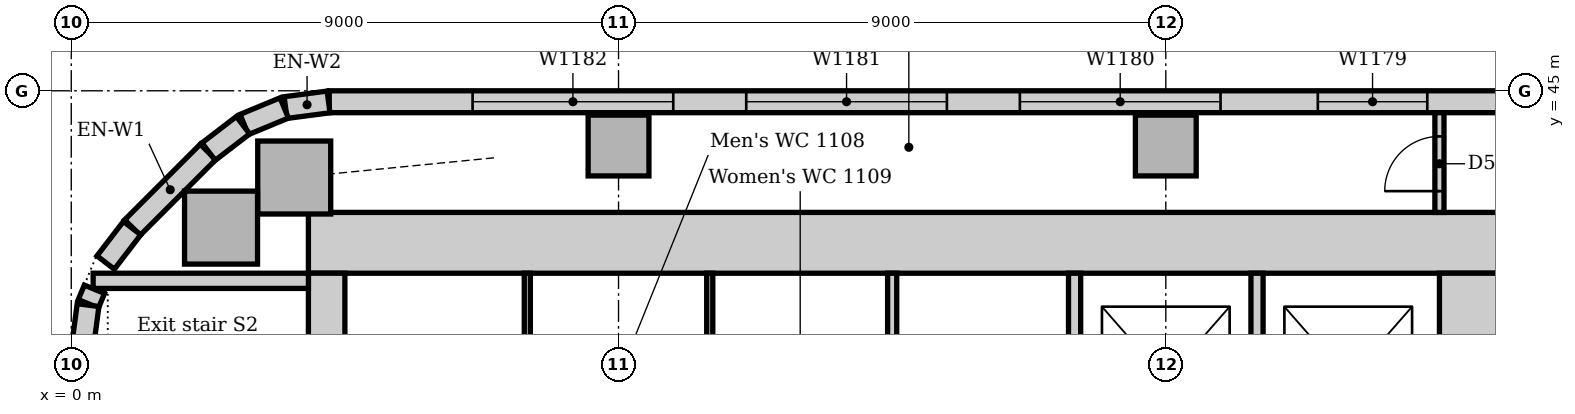
"""IFC4 building model, lengths in metres.
Left out: names, types, materials, properties, quantities, classifications, styles, units other than length and angle.
Written with IfcOpenShell. Run it as: python <this file> out.ifc"""

import sys

from ifc_helpers import new_model, si_unit, direction, frame, frame_2d, origin, origin_2d, place, context, subcontext, project, spatial, rectangle, extrude, element, fill, save


model = new_model("IFC4")
c1 = context("Model", 3, precision=1e-05, world=origin(), true_north=direction((0.0, 1.0)))
c2 = subcontext(c1, "Body", "Model", "MODEL_VIEW")
j1 = project(units=[si_unit("LENGTHUNIT", "METRE"), si_unit("PLANEANGLEUNIT", "RADIAN")], contexts=[c1])
p1 = place(None, origin())
s1 = spatial("IfcSite", under=j1, at=p1, CompositionType="ELEMENT")
p2 = place(p1, origin())
s2 = spatial("IfcBuilding", under=s1, at=p2, CompositionType="ELEMENT")
p3 = place(p2, frame((0.0, 0.0, 51.0)))
s3 = spatial("IfcBuildingStorey", under=s2, at=p3, CompositionType="ELEMENT", Elevation=51.0)
p4 = place(p3, frame((23.5, 42.5, 0.0), z_axis=(0.0, 0.0, 1.0), x_axis=(-1.0, 0.0, 0.0)))
e1 = element("IfcWall", 1, at=p4, inside=s3, PredefinedType="SOLIDWALL", context=c2, shape_type="SweptSolid", body=[
    extrude(rectangle(XDim=19.6, YDim=1.0, at=frame_2d((9.8, 0.0))), origin(), (0.0, 0.0, 1.0), 4.0),
])
p5 = place(p3, frame((23.0, 31.5, 0.0), z_axis=(0.0, 0.0, 1.0), x_axis=(0.0, 1.0, 0.0)))
e2 = element("IfcWall", 2, at=p5, inside=s3, PredefinedType="SOLIDWALL", context=c2, shape_type="SweptSolid", body=[
    extrude(rectangle(XDim=10.5, YDim=1.0, at=frame_2d((5.25, 0.0))), origin(), (0.0, 0.0, 1.0), 4.0),
])
p6 = place(p5, frame((3.15, 0.0, 0.0)))
e3 = element("IfcOpeningElement", 3, at=p6, cuts=e2, PredefinedType="OPENING", context=c2, shape_type="SweptSolid", body=[
    extrude(rectangle(XDim=1.0, YDim=2.1, at=frame_2d((0.5, 1.05))), frame((0.0, 0.51, 0.0), z_axis=(0.0, -1.0, 0.0), x_axis=(1.0, 0.0, 0.0)), (0.0, 0.0, 1.0), 1.02),
])
p7 = place(p5, frame((5.2, 0.0, 0.0)))
e4 = element("IfcOpeningElement", 4, at=p7, cuts=e2, PredefinedType="OPENING", context=c2, shape_type="SweptSolid", body=[
    extrude(rectangle(XDim=1.0, YDim=2.1, at=frame_2d((0.5, 1.05))), frame((0.0, 0.51, 0.0), z_axis=(0.0, -1.0, 0.0), x_axis=(1.0, 0.0, 0.0)), (0.0, 0.0, 1.0), 1.02),
])
p8 = place(p3, frame((4.2, 42.0, 0.0), z_axis=(0.0, 0.0, 1.0), x_axis=(0.0, -1.0, 0.0)))
e5 = element("IfcWall", 5, at=p8, inside=s3, PredefinedType="SOLIDWALL", context=c2, shape_type="SweptSolid", body=[
    extrude(rectangle(XDim=10.5, YDim=0.6, at=frame_2d((5.25, 0.0))), origin(), (0.0, 0.0, 1.0), 4.0),
])
p9 = place(p8, frame((5.3, 0.0, 0.0)))
e6 = element("IfcOpeningElement", 6, at=p9, cuts=e5, PredefinedType="OPENING", context=c2, shape_type="SweptSolid", body=[
    extrude(rectangle(XDim=1.0, YDim=2.1, at=frame_2d((0.5, 1.05))), frame((0.0, 0.31, 0.0), z_axis=(0.0, -1.0, 0.0), x_axis=(1.0, 0.0, 0.0)), (0.0, 0.0, 1.0), 0.62),
])
p10 = place(p3, frame((3.9, 41.875, 0.0), z_axis=(0.0, 0.0, 1.0), x_axis=(-1.0, 0.0, 0.0)))
e7 = element("IfcWall", 7, at=p10, inside=s3, PredefinedType="SOLIDWALL", context=c2, shape_type="SweptSolid", body=[
    extrude(rectangle(XDim=3.54, YDim=0.25, at=frame_2d((1.77, 0.0))), origin(), (0.0, 0.0, 1.0), 4.0),
])
for number, where, z_axis, x_axis in (
    (8, (3.667, 43.574, 0.0), (0.0, 0.0, 1.0), (1.0, 0.0, 0.0)),
    (9, (2.463, 42.75, 0.0), (0.0, 0.0, 1.0), (1.0, 0.0, 0.0)),
):
    element("IfcColumn", number, at=place(p3, frame(where, z_axis=z_axis, x_axis=x_axis)), inside=s3, PredefinedType="COLUMN", context=c2, shape_type="SweptSolid", body=[
        extrude(rectangle(XDim=1.2, YDim=1.2, at=origin_2d()), origin(), (0.0, 0.0, 1.0), 3.85),
    ])
for number, where, z_axis, x_axis in (
    (10, (9.0, 44.1, 0.0), (0.0, 0.0, 1.0), (1.0, 0.0, 0.0)),
    (11, (18.0, 44.1, 0.0), (0.0, 0.0, 1.0), (1.0, 0.0, 0.0)),
):
    element("IfcColumn", number, at=place(p3, frame(where, z_axis=z_axis, x_axis=x_axis)), inside=s3, PredefinedType="COLUMN", context=c2, shape_type="SweptSolid", body=[
        extrude(rectangle(XDim=1.0, YDim=1.0, at=origin_2d()), origin(), (0.0, 0.0, 1.0), 3.85),
    ])
p11 = place(p3, frame((48.257, 44.82, 0.0), z_axis=(0.0, 0.0, 1.0), x_axis=(-1.0, 0.0, 0.0)))
e12 = element("IfcWall", 12, at=p11, inside=s3, PredefinedType="STANDARD", context=c2, shape_type="SweptSolid", body=[
    extrude(rectangle(XDim=44.015, YDim=0.36, at=frame_2d((22.007, 0.0))), origin(), (0.0, 0.0, 1.0), 3.85),
])
p12 = place(p11, frame((2.057, 0.0, 0.9)))
e13 = element("IfcOpeningElement", 13, at=p12, cuts=e12, PredefinedType="OPENING", context=c2, shape_type="SweptSolid", body=[
    extrude(rectangle(XDim=3.3, YDim=1.6, at=frame_2d((1.65, 0.8))), frame((0.0, 0.19, 0.0), z_axis=(0.0, -1.0, 0.0), x_axis=(1.0, 0.0, 0.0)), (0.0, 0.0, 1.0), 0.38),
])
p13 = place(p11, frame((6.857, 0.0, 0.9)))
e14 = element("IfcOpeningElement", 14, at=p13, cuts=e12, PredefinedType="OPENING", context=c2, shape_type="SweptSolid", body=[
    extrude(rectangle(XDim=3.3, YDim=1.6, at=frame_2d((1.65, 0.8))), frame((0.0, 0.19, 0.0), z_axis=(0.0, -1.0, 0.0), x_axis=(1.0, 0.0, 0.0)), (0.0, 0.0, 1.0), 0.38),
])
p14 = place(p11, frame((11.357, 0.0, 0.9)))
e15 = element("IfcOpeningElement", 15, at=p14, cuts=e12, PredefinedType="OPENING", context=c2, shape_type="SweptSolid", body=[
    extrude(rectangle(XDim=3.3, YDim=1.6, at=frame_2d((1.65, 0.8))), frame((0.0, 0.19, 0.0), z_axis=(0.0, -1.0, 0.0), x_axis=(1.0, 0.0, 0.0)), (0.0, 0.0, 1.0), 0.38),
])
p15 = place(p11, frame((15.857, 0.0, 0.9)))
e16 = element("IfcOpeningElement", 16, at=p15, cuts=e12, PredefinedType="OPENING", context=c2, shape_type="SweptSolid", body=[
    extrude(rectangle(XDim=3.3, YDim=1.6, at=frame_2d((1.65, 0.8))), frame((0.0, 0.19, 0.0), z_axis=(0.0, -1.0, 0.0), x_axis=(1.0, 0.0, 0.0)), (0.0, 0.0, 1.0), 0.38),
])
p16 = place(p11, frame((20.357, 0.0, 0.9)))
e17 = element("IfcOpeningElement", 17, at=p16, cuts=e12, PredefinedType="OPENING", context=c2, shape_type="SweptSolid", body=[
    extrude(rectangle(XDim=3.3, YDim=1.6, at=frame_2d((1.65, 0.8))), frame((0.0, 0.19, 0.0), z_axis=(0.0, -1.0, 0.0), x_axis=(1.0, 0.0, 0.0)), (0.0, 0.0, 1.0), 0.38),
])
p17 = place(p11, frame((25.957, 0.0, 0.9)))
e18 = element("IfcOpeningElement", 18, at=p17, cuts=e12, PredefinedType="OPENING", context=c2, shape_type="SweptSolid", body=[
    extrude(rectangle(XDim=1.8, YDim=1.6, at=frame_2d((0.9, 0.8))), frame((0.0, 0.19, 0.0), z_axis=(0.0, -1.0, 0.0), x_axis=(1.0, 0.0, 0.0)), (0.0, 0.0, 1.0), 0.38),
])
p18 = place(p11, frame((29.357, 0.0, 0.9)))
e19 = element("IfcOpeningElement", 19, at=p18, cuts=e12, PredefinedType="OPENING", context=c2, shape_type="SweptSolid", body=[
    extrude(rectangle(XDim=3.3, YDim=1.6, at=frame_2d((1.65, 0.8))), frame((0.0, 0.19, 0.0), z_axis=(0.0, -1.0, 0.0), x_axis=(1.0, 0.0, 0.0)), (0.0, 0.0, 1.0), 0.38),
])
p19 = place(p11, frame((33.857, 0.0, 0.9)))
e20 = element("IfcOpeningElement", 20, at=p19, cuts=e12, PredefinedType="OPENING", context=c2, shape_type="SweptSolid", body=[
    extrude(rectangle(XDim=3.3, YDim=1.6, at=frame_2d((1.65, 0.8))), frame((0.0, 0.19, 0.0), z_axis=(0.0, -1.0, 0.0), x_axis=(1.0, 0.0, 0.0)), (0.0, 0.0, 1.0), 0.38),
])
p20 = place(p11, frame((38.357, 0.0, 0.9)))
e21 = element("IfcOpeningElement", 21, at=p20, cuts=e12, PredefinedType="OPENING", context=c2, shape_type="SweptSolid", body=[
    extrude(rectangle(XDim=3.3, YDim=1.6, at=frame_2d((1.65, 0.8))), frame((0.0, 0.19, 0.0), z_axis=(0.0, -1.0, 0.0), x_axis=(1.0, 0.0, 0.0)), (0.0, 0.0, 1.0), 0.38),
])
p21 = place(p3, frame((2.249, 43.994, 0.0), z_axis=(0.0, 0.0, 1.0), x_axis=(-0.707106781187, -0.707106781187, 0.0)))
e22 = element("IfcWall", 22, at=p21, inside=s3, PredefinedType="STANDARD", context=c2, shape_type="SweptSolid", body=[
    extrude(rectangle(XDim=1.757, YDim=0.36, at=frame_2d((0.879, 0.0))), origin(), (0.0, 0.0, 1.0), 3.85),
])
for number, where, z_axis, x_axis in (
    (23, (4.231, 44.817, 0.0), (0.0, 0.0, 1.0), (-0.991, -0.131, 0.0)),
    (24, (3.503, 44.718, 0.0), (0.0, 0.0, 1.0), (-0.924, -0.383, 0.0)),
):
    element("IfcWall", number, at=place(p3, frame(where, z_axis=z_axis, x_axis=x_axis)), inside=s3, PredefinedType="STANDARD", context=c2, shape_type="SweptSolid", body=[
        extrude(rectangle(XDim=0.713, YDim=0.36, at=frame_2d((0.356, 0.0))), origin(), (0.0, 0.0, 1.0), 3.85),
    ])
for number, where, z_axis, x_axis in (
    (25, (2.825, 44.434, 0.0), (0.0, 0.0, 1.0), (-0.793, -0.609, 0.0)),
    (26, (1.0, 42.741, 0.0), (0.0, 0.0, 1.0), (-0.609, -0.793, 0.0)),
):
    element("IfcWall", number, at=place(p3, frame(where, z_axis=z_axis, x_axis=x_axis)), inside=s3, PredefinedType="STANDARD", context=c2, shape_type="SweptSolid", body=[
        extrude(rectangle(XDim=0.713, YDim=0.36, at=frame_2d((0.357, 0.0))), origin(), (0.0, 0.0, 1.0), 3.85),
    ])
p22 = place(p3, frame((0.381, 41.736, 0.0), z_axis=(0.0, 0.0, 1.0), x_axis=(-0.382773360986, -0.923842277729, 0.0)))
e27 = element("IfcWall", 27, at=p22, inside=s3, PredefinedType="STANDARD", context=c2, shape_type="SweptSolid", body=[
    extrude(rectangle(XDim=0.258, YDim=0.36, at=frame_2d((0.129, 0.0))), origin(), (0.0, 0.0, 1.0), 3.85),
])
p23 = place(p3, frame((0.276, 41.476, 0.0), z_axis=(0.0, 0.0, 1.0), x_axis=(-0.13055608231, -0.99144092581, 0.0)))
e28 = element("IfcWall", 28, at=p23, inside=s3, PredefinedType="STANDARD", context=c2, shape_type="SweptSolid", body=[
    extrude(rectangle(XDim=0.713, YDim=0.36, at=frame_2d((0.356, 0.0))), origin(), (0.0, 0.0, 1.0), 3.85),
])
for number, where, z_axis, x_axis in (
    (29, (16.5, 38.6, 0.0), (0.0, 0.0, 1.0), (0.0, 1.0, 0.0)),
    (30, (19.5, 38.6, 0.0), (0.0, 0.0, 1.0), (0.0, 1.0, 0.0)),
):
    element("IfcWall", number, at=place(p3, frame(where, z_axis=z_axis, x_axis=x_axis)), inside=s3, PredefinedType="PARTITIONING", context=c2, shape_type="SweptSolid", body=[
        extrude(rectangle(XDim=3.4, YDim=0.2, at=frame_2d((1.7, 0.0))), origin(), (0.0, 0.0, 1.0), 3.85),
    ])
p24 = place(p3, frame((22.5, 43.0, 0.0), z_axis=(0.0, 0.0, 1.0), x_axis=(0.0, 1.0, 0.0)))
e31 = element("IfcWall", 31, at=p24, inside=s3, PredefinedType="PARTITIONING", context=c2, shape_type="SweptSolid", body=[
    extrude(rectangle(XDim=1.64, YDim=0.15, at=frame_2d((0.82, 0.0))), origin(), (0.0, 0.0, 1.0), 3.85),
])
p25 = place(p24, frame((0.35, 0.0, 0.0)))
e32 = element("IfcOpeningElement", 32, at=p25, cuts=e31, PredefinedType="OPENING", context=c2, shape_type="SweptSolid", body=[
    extrude(rectangle(XDim=0.9, YDim=2.1, at=frame_2d((0.45, 1.05))), frame((0.0, 0.085, 0.0), z_axis=(0.0, -1.0, 0.0), x_axis=(1.0, 0.0, 0.0)), (0.0, 0.0, 1.0), 0.17),
])
p26 = place(p3, frame((13.5, 38.575, 0.0), z_axis=(0.0, 0.0, 1.0), x_axis=(0.0, 1.0, 0.0)))
e33 = element("IfcWall", 33, at=p26, inside=s3, PredefinedType="PARTITIONING", context=c2, shape_type="SweptSolid", body=[
    extrude(rectangle(XDim=3.425, YDim=0.15, at=frame_2d((1.712, 0.0))), origin(), (0.0, 0.0, 1.0), 3.85),
])
for number, where, z_axis, x_axis in (
    (34, (7.5, 38.575, 0.0), (0.0, 0.0, 1.0), (0.0, 1.0, 0.0)),
    (35, (10.5, 38.575, 0.0), (0.0, 0.0, 1.0), (0.0, 1.0, 0.0)),
):
    element("IfcWall", number, at=place(p3, frame(where, z_axis=z_axis, x_axis=x_axis)), inside=s3, PredefinedType="PARTITIONING", context=c2, shape_type="SweptSolid", body=[
        extrude(rectangle(XDim=3.425, YDim=0.1, at=frame_2d((1.712, 0.0))), origin(), (0.0, 0.0, 1.0), 3.85),
    ])
p27 = place(p17, origin())
e36 = element("IfcWindow", 36, at=p27, inside=s3, PartitioningType="SINGLE_PANEL", PredefinedType="WINDOW", context=c2, shape_type="SweptSolid", body=[
    extrude(rectangle(XDim=1.8, YDim=1.6, at=frame_2d((0.9, 0.8))), frame((0.0, 0.13, 0.0), z_axis=(0.0, -1.0, 0.0), x_axis=(1.0, 0.0, 0.0)), (0.0, 0.0, 1.0), 0.06),
])
fill(e18, e36)
p28 = place(p18, origin())
e37 = element("IfcWindow", 37, at=p28, inside=s3, PartitioningType="SINGLE_PANEL", PredefinedType="WINDOW", context=c2, shape_type="SweptSolid", body=[
    extrude(rectangle(XDim=3.3, YDim=1.6, at=frame_2d((1.65, 0.8))), frame((0.0, 0.13, 0.0), z_axis=(0.0, -1.0, 0.0), x_axis=(1.0, 0.0, 0.0)), (0.0, 0.0, 1.0), 0.06),
])
fill(e19, e37)
p29 = place(p19, origin())
e38 = element("IfcWindow", 38, at=p29, inside=s3, PartitioningType="SINGLE_PANEL", PredefinedType="WINDOW", context=c2, shape_type="SweptSolid", body=[
    extrude(rectangle(XDim=3.3, YDim=1.6, at=frame_2d((1.65, 0.8))), frame((0.0, 0.13, 0.0), z_axis=(0.0, -1.0, 0.0), x_axis=(1.0, 0.0, 0.0)), (0.0, 0.0, 1.0), 0.06),
])
fill(e20, e38)
p30 = place(p20, origin())
e39 = element("IfcWindow", 39, at=p30, inside=s3, PartitioningType="SINGLE_PANEL", PredefinedType="WINDOW", context=c2, shape_type="SweptSolid", body=[
    extrude(rectangle(XDim=3.3, YDim=1.6, at=frame_2d((1.65, 0.8))), frame((0.0, 0.13, 0.0), z_axis=(0.0, -1.0, 0.0), x_axis=(1.0, 0.0, 0.0)), (0.0, 0.0, 1.0), 0.06),
])
fill(e21, e39)
p31 = place(p25, origin())
e40 = element("IfcDoor", 40, at=p31, inside=s3, OperationType="SINGLE_SWING_LEFT", PredefinedType="DOOR", context=c2, shape_type="SweptSolid", body=[
    extrude(rectangle(XDim=0.9, YDim=2.1, at=frame_2d((0.45, 1.05))), frame((0.0, 0.025, 0.0), z_axis=(0.0, -1.0, 0.0), x_axis=(1.0, 0.0, 0.0)), (0.0, 0.0, 1.0), 0.05),
])
fill(e32, e40)
save(model, sys.argv[1])
